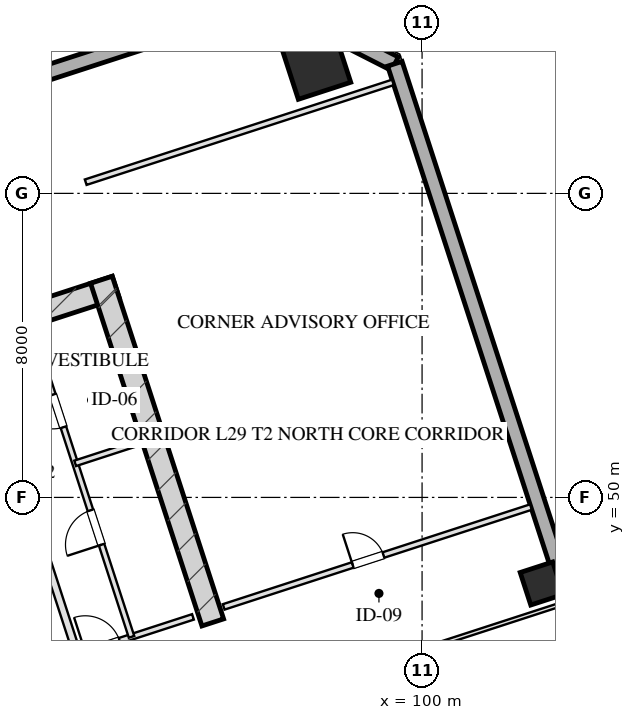
"""IFC4 building model, lengths in metres.
Left out: names, types, materials, properties, quantities, classifications, styles, units other than length and angle.
Written with IfcOpenShell. Run it as: python <this file> out.ifc"""

import sys

from ifc_helpers import new_model, si_unit, direction, frame, frame_2d, origin, origin_2d, place, context, subcontext, project, spatial, rectangle, hollow_rectangle, extrude, element, fill, save


model = new_model("IFC4")
c1 = context("Model", 3, precision=1e-05, world=origin(), true_north=direction((0.0, 1.0)))
c2 = subcontext(c1, "Body", "Model", "MODEL_VIEW")
j1 = project(units=[si_unit("LENGTHUNIT", "METRE"), si_unit("PLANEANGLEUNIT", "RADIAN")], contexts=[c1])
p1 = place(None, origin())
s1 = spatial("IfcSite", under=j1, at=p1, CompositionType="ELEMENT")
p2 = place(p1, origin())
s2 = spatial("IfcBuilding", under=s1, at=p2, CompositionType="ELEMENT")
p3 = place(p2, frame((0.0, 0.0, 113.85)))
s3 = spatial("IfcBuildingStorey", under=s2, at=p3, CompositionType="ELEMENT", Elevation=113.85)
p4 = place(p3, frame((76.344, 50.466, 0.0), z_axis=(0.0, 0.0, 1.0), x_axis=(0.951055727519, 0.309019421968, 0.0)))
e1 = element("IfcWall", 1, at=p4, inside=s3, PredefinedType="SHEAR", context=c2, shape_type="SweptSolid", body=[
    extrude(rectangle(XDim=16.4, YDim=0.6, at=frame_2d((8.2, 0.0))), origin(), (0.0, 0.0, 1.0), 3.45),
])
p5 = place(p3, frame((94.492, 46.71, 0.0), z_axis=(0.0, 0.0, 1.0), x_axis=(-0.309010370028, 0.95105866865, 0.0)))
e2 = element("IfcWall", 2, at=p5, inside=s3, PredefinedType="SHEAR", context=c2, shape_type="SweptSolid", body=[
    extrude(rectangle(XDim=9.48, YDim=0.6, at=frame_2d((4.74, 0.0))), origin(), (0.0, 0.0, 1.0), 3.45),
])
p6 = place(p3, frame((97.209, 61.388, 0.0), z_axis=(0.0, 0.0, 1.0), x_axis=(0.951056516295, 0.309016994375, 0.0)))
e3 = element("IfcColumn", 3, at=p6, inside=s3, PredefinedType="COLUMN", context=c2, shape_type="SweptSolid", body=[
    extrude(hollow_rectangle(XDim=1.45, YDim=1.45, WallThickness=0.05, at=origin_2d()), origin(), (0.0, 0.0, 1.0), 3.451),
])
p7 = place(p3, frame((103.149, 47.736, 0.0), z_axis=(0.0, 0.0, 1.0), x_axis=(0.951056516295, 0.309016994375, 0.0)))
e4 = element("IfcColumn", 4, at=p7, inside=s3, PredefinedType="COLUMN", context=c2, shape_type="SweptSolid", body=[
    extrude(hollow_rectangle(XDim=0.9, YDim=0.9, WallThickness=0.032, at=origin_2d()), origin(), (0.0, 0.0, 1.0), 3.451),
])
p8 = place(p3, frame((68.047, 53.995, 0.0), z_axis=(0.0, 0.0, 1.0), x_axis=(0.95105505922, 0.309021478754, 0.0)))
e5 = element("IfcWall", 5, at=p8, inside=s3, PredefinedType="SOLIDWALL", context=c2, shape_type="SweptSolid", body=[
    extrude(rectangle(XDim=29.4, YDim=0.4, at=frame_2d((14.7, 0.0))), origin(), (0.0, 0.0, 1.0), 2.61),
])
p9 = place(p3, frame((96.008, 63.08, 0.0), z_axis=(0.0, 0.0, 1.0), x_axis=(0.891001999643, -0.45399937955, 0.0)))
e6 = element("IfcWall", 6, at=p9, inside=s3, PredefinedType="SOLIDWALL", context=c2, shape_type="SweptSolid", body=[
    extrude(rectangle(XDim=3.677, YDim=0.4, at=frame_2d((1.839, 0.0))), origin(), (0.0, 0.0, 1.0), 2.61),
])
p10 = place(p3, frame((99.284, 61.41, 0.0), z_axis=(0.0, 0.0, 1.0), x_axis=(0.309017542002, -0.95105633836, 0.0)))
e7 = element("IfcWall", 7, at=p10, inside=s3, PredefinedType="SOLIDWALL", context=c2, shape_type="SweptSolid", body=[
    extrude(rectangle(XDim=46.4, YDim=0.4, at=frame_2d((23.2, 0.0))), origin(), (0.0, 0.0, 1.0), 2.61),
])
p11 = place(p10, frame((28.4, 0.0, 0.75)))
e8 = element("IfcOpeningElement", 8, at=p11, cuts=e7, PredefinedType="OPENING", context=c2, shape_type="SweptSolid", body=[
    extrude(rectangle(XDim=2.4, YDim=1.46, at=frame_2d((1.2, 0.73))), frame((0.0, 0.21, 0.0), z_axis=(0.0, -1.0, 0.0), x_axis=(1.0, 0.0, 0.0)), (0.0, 0.0, 1.0), 0.42),
])
p12 = place(p10, frame((16.85, 0.0, 0.0)))
e9 = element("IfcOpeningElement", 9, at=p12, cuts=e7, PredefinedType="OPENING", context=c2, shape_type="SweptSolid", body=[
    extrude(rectangle(XDim=1.1, YDim=2.15, at=frame_2d((0.55, 1.075))), frame((0.0, 0.21, 0.0), z_axis=(0.0, -1.0, 0.0), x_axis=(1.0, 0.0, 0.0)), (0.0, 0.0, 1.0), 0.42),
])
p13 = place(p3, frame((90.928, 45.868, 0.0), z_axis=(0.0, 0.0, 1.0), x_axis=(-0.309042196757, 0.951048327176, 0.0)))
e10 = element("IfcWall", 10, at=p13, inside=s3, PredefinedType="PARTITIONING", context=c2, shape_type="SweptSolid", body=[
    extrude(rectangle(XDim=8.43, YDim=0.2, at=frame_2d((4.215, 0.0))), origin(), (0.0, 0.0, 1.0), 3.175),
])
p14 = place(p3, frame((90.928, 45.868, 0.0), z_axis=(0.0, 0.0, 1.0), x_axis=(0.951059297078, 0.309008435874, 0.0)))
e11 = element("IfcWall", 11, at=p14, inside=s3, PredefinedType="PARTITIONING", context=c2, shape_type="SweptSolid", body=[
    extrude(rectangle(XDim=3.2, YDim=0.15, at=frame_2d((1.6, 0.0))), origin(), (0.0, 0.0, 1.0), 3.175),
])
p15 = place(p14, frame((0.22, 0.0, 0.0)))
e12 = element("IfcOpeningElement", 12, at=p15, cuts=e11, PredefinedType="OPENING", context=c2, shape_type="SweptSolid", body=[
    extrude(rectangle(XDim=0.95, YDim=2.05, at=frame_2d((0.475, 1.025))), frame((0.0, 0.085, 0.0), z_axis=(0.0, -1.0, 0.0), x_axis=(1.0, 0.0, 0.0)), (0.0, 0.0, 1.0), 0.17),
])
p16 = place(p3, frame((92.355, 46.331, 0.0), z_axis=(0.0, 0.0, 1.0), x_axis=(-0.309007490203, 0.951059604335, 0.0)))
e13 = element("IfcWall", 13, at=p16, inside=s3, PredefinedType="PARTITIONING", context=c2, shape_type="SweptSolid", body=[
    extrude(rectangle(XDim=8.43, YDim=0.15, at=frame_2d((4.215, 0.0))), origin(), (0.0, 0.0, 1.0), 3.175),
])
p17 = place(p16, frame((2.55, 0.0, 0.0)))
e14 = element("IfcOpeningElement", 14, at=p17, cuts=e13, PredefinedType="OPENING", context=c2, shape_type="SweptSolid", body=[
    extrude(rectangle(XDim=0.95, YDim=2.05, at=frame_2d((0.475, 1.025))), frame((0.0, 0.085, 0.0), z_axis=(0.0, -1.0, 0.0), x_axis=(1.0, 0.0, 0.0)), (0.0, 0.0, 1.0), 0.17),
])
p18 = place(p16, frame((5.8, 0.0, 0.0)))
e15 = element("IfcOpeningElement", 15, at=p18, cuts=e13, PredefinedType="OPENING", context=c2, shape_type="SweptSolid", body=[
    extrude(rectangle(XDim=0.9, YDim=2.05, at=frame_2d((0.45, 1.025))), frame((0.0, 0.085, 0.0), z_axis=(0.0, -1.0, 0.0), x_axis=(1.0, 0.0, 0.0)), (0.0, 0.0, 1.0), 0.17),
])
p19 = place(p3, frame((90.871, 50.896, 0.0), z_axis=(0.0, 0.0, 1.0), x_axis=(0.951054116971, 0.309024378638, 0.0)))
e16 = element("IfcWall", 16, at=p19, inside=s3, PredefinedType="PARTITIONING", context=c2, shape_type="SweptSolid", body=[
    extrude(rectangle(XDim=1.7, YDim=0.15, at=frame_2d((0.85, 0.0))), origin(), (0.0, 0.0, 1.0), 3.175),
])
p20 = place(p3, frame((91.149, 58.294, 0.0), z_axis=(0.0, 0.0, 1.0), x_axis=(0.951062770994, 0.308997743729, 0.0)))
e17 = element("IfcWall", 17, at=p20, inside=s3, PredefinedType="PARTITIONING", context=c2, shape_type="SweptSolid", body=[
    extrude(rectangle(XDim=8.5, YDim=0.15, at=frame_2d((4.25, 0.0))), origin(), (0.0, 0.0, 1.0), 3.175),
])
p21 = place(p3, frame((94.78, 47.119, 0.0), z_axis=(0.0, 0.0, 1.0), x_axis=(0.951054329824, 0.309023723562, 0.0)))
e18 = element("IfcWall", 18, at=p21, inside=s3, PredefinedType="PARTITIONING", context=c2, shape_type="SweptSolid", body=[
    extrude(rectangle(XDim=8.5, YDim=0.15, at=frame_2d((4.25, 0.0))), origin(), (0.0, 0.0, 1.0), 3.175),
])
p22 = place(p21, frame((3.57, 0.0, 0.0)))
e19 = element("IfcOpeningElement", 19, at=p22, cuts=e18, PredefinedType="OPENING", context=c2, shape_type="SweptSolid", body=[
    extrude(rectangle(XDim=0.85, YDim=2.05, at=frame_2d((0.425, 1.025))), frame((0.0, 0.085, 0.0), z_axis=(0.0, -1.0, 0.0), x_axis=(1.0, 0.0, 0.0)), (0.0, 0.0, 1.0), 0.17),
])
p23 = place(p3, frame((95.418, 44.509, 0.0), z_axis=(0.0, 0.0, 1.0), x_axis=(0.951055307445, 0.309020714809, 0.0)))
e20 = element("IfcWall", 20, at=p23, inside=s3, PredefinedType="MOVABLE", context=c2, shape_type="SweptSolid", body=[
    extrude(rectangle(XDim=8.7, YDim=0.1, at=frame_2d((4.35, 0.0))), origin(), (0.0, 0.0, 1.0), 3.175),
])
p24 = place(p15, origin())
e21 = element("IfcDoor", 21, at=p24, inside=s3, OperationType="SINGLE_SWING_LEFT", PredefinedType="DOOR", context=c2, shape_type="SweptSolid", body=[
    extrude(rectangle(XDim=0.95, YDim=2.05, at=frame_2d((0.475, 1.025))), frame((0.0, 0.025, 0.0), z_axis=(0.0, -1.0, 0.0), x_axis=(1.0, 0.0, 0.0)), (0.0, 0.0, 1.0), 0.05),
])
fill(e12, e21)
p25 = place(p17, origin())
e22 = element("IfcDoor", 22, at=p25, inside=s3, OperationType="SINGLE_SWING_LEFT", PredefinedType="DOOR", context=c2, shape_type="SweptSolid", body=[
    extrude(rectangle(XDim=0.95, YDim=2.05, at=frame_2d((0.475, 1.025))), frame((0.0, 0.025, 0.0), z_axis=(0.0, -1.0, 0.0), x_axis=(1.0, 0.0, 0.0)), (0.0, 0.0, 1.0), 0.05),
])
fill(e14, e22)
p26 = place(p18, origin())
e23 = element("IfcDoor", 23, at=p26, inside=s3, OperationType="SINGLE_SWING_RIGHT", PredefinedType="DOOR", context=c2, shape_type="SweptSolid", body=[
    extrude(rectangle(XDim=0.9, YDim=2.05, at=frame_2d((0.45, 1.025))), frame((0.0, 0.025, 0.0), z_axis=(0.0, -1.0, 0.0), x_axis=(1.0, 0.0, 0.0)), (0.0, 0.0, 1.0), 0.05),
])
fill(e15, e23)
p27 = place(p22, origin())
e24 = element("IfcDoor", 24, at=p27, inside=s3, OperationType="SINGLE_SWING_LEFT", PredefinedType="DOOR", context=c2, shape_type="SweptSolid", body=[
    extrude(rectangle(XDim=0.85, YDim=2.05, at=frame_2d((0.425, 1.025))), frame((0.0, 0.025, 0.0), z_axis=(0.0, -1.0, 0.0), x_axis=(1.0, 0.0, 0.0)), (0.0, 0.0, 1.0), 0.05),
])
fill(e19, e24)
save(model, sys.argv[1])
